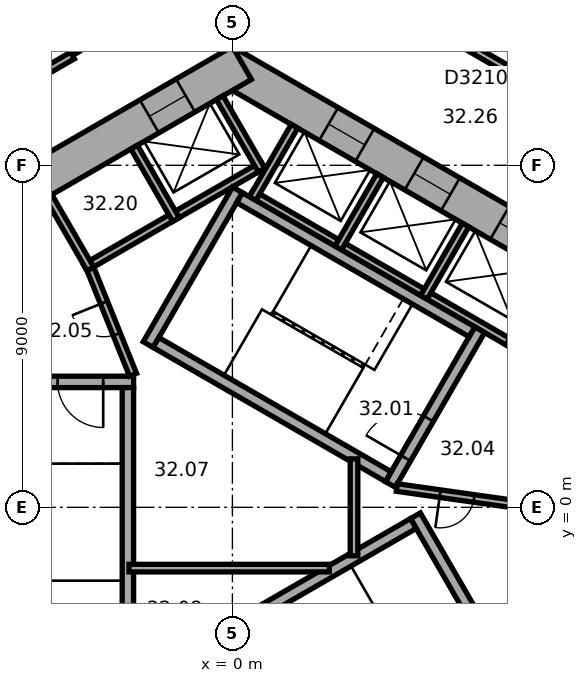
"""IFC4 building model, lengths in metres.
Left out: names, types, materials, properties, quantities, classifications, styles, units other than length and angle.
Written with IfcOpenShell. Run it as: python <this file> out.ifc"""

import sys

from ifc_helpers import new_model, si_unit, direction, frame, frame_2d, origin, place, context, subcontext, project, spatial, rectangle, extrude, element, fill, save


model = new_model("IFC4")
c1 = context("Model", 3, precision=1e-05, world=origin(), true_north=direction((0.0, 1.0)))
c2 = subcontext(c1, "Body", "Model", "MODEL_VIEW")
j1 = project(units=[si_unit("LENGTHUNIT", "METRE"), si_unit("PLANEANGLEUNIT", "RADIAN")], contexts=[c1])
p1 = place(None, origin())
s1 = spatial("IfcSite", under=j1, at=p1, CompositionType="ELEMENT")
p2 = place(p1, origin())
s2 = spatial("IfcBuilding", under=s1, at=p2, CompositionType="ELEMENT")
p3 = place(p2, frame((0.0, 0.0, 131.8)))
s3 = spatial("IfcBuildingStorey", under=s2, at=p3, CompositionType="ELEMENT", Elevation=131.8)
p4 = place(p3, frame((10.25, 5.629, 0.0), z_axis=(0.0, 0.0, 1.0), x_axis=(-0.866022616891, 0.50000482701, 0.0)))
e1 = element("IfcWall", 1, at=p4, inside=s3, PredefinedType="SHEAR", context=c2, shape_type="SweptSolid", body=[
    extrude(rectangle(XDim=12.125, YDim=1.0, at=frame_2d((6.062, 0.0))), origin(), (0.0, 0.0, 1.0), 3.7),
])
p5 = place(p4, frame((2.612, 0.0, 0.0)))
e2 = element("IfcOpeningElement", 2, at=p5, cuts=e1, PredefinedType="OPENING", context=c2, shape_type="SweptSolid", body=[
    extrude(rectangle(XDim=1.1, YDim=2.1, at=frame_2d((0.55, 1.05))), frame((0.0, 0.51, 0.0), z_axis=(0.0, -1.0, 0.0), x_axis=(1.0, 0.0, 0.0)), (0.0, 0.0, 1.0), 1.02),
])
p6 = place(p4, frame((5.212, 0.0, 0.0)))
e3 = element("IfcOpeningElement", 3, at=p6, cuts=e1, PredefinedType="OPENING", context=c2, shape_type="SweptSolid", body=[
    extrude(rectangle(XDim=1.1, YDim=2.1, at=frame_2d((0.55, 1.05))), frame((0.0, 0.51, 0.0), z_axis=(0.0, -1.0, 0.0), x_axis=(1.0, 0.0, 0.0)), (0.0, 0.0, 1.0), 1.02),
])
p7 = place(p4, frame((7.812, 0.0, 0.0)))
e4 = element("IfcOpeningElement", 4, at=p7, cuts=e1, PredefinedType="OPENING", context=c2, shape_type="SweptSolid", body=[
    extrude(rectangle(XDim=1.1, YDim=2.1, at=frame_2d((0.55, 1.05))), frame((0.0, 0.51, 0.0), z_axis=(0.0, -1.0, 0.0), x_axis=(1.0, 0.0, 0.0)), (0.0, 0.0, 1.0), 1.02),
])
p8 = place(p3, frame((0.25, 11.691, 0.0), z_axis=(0.0, 0.0, 1.0), x_axis=(-0.866022616891, -0.50000482701, 0.0)))
e5 = element("IfcWall", 5, at=p8, inside=s3, PredefinedType="SHEAR", context=c2, shape_type="SweptSolid", body=[
    extrude(rectangle(XDim=12.125, YDim=1.0, at=frame_2d((6.062, 0.0))), origin(), (0.0, 0.0, 1.0), 3.7),
])
p9 = place(p8, frame((6.262, 0.0, 0.0)))
e6 = element("IfcOpeningElement", 6, at=p9, cuts=e5, PredefinedType="OPENING", context=c2, shape_type="SweptSolid", body=[
    extrude(rectangle(XDim=1.5, YDim=2.1, at=frame_2d((0.75, 1.05))), frame((0.0, 0.51, 0.0), z_axis=(0.0, -1.0, 0.0), x_axis=(1.0, 0.0, 0.0)), (0.0, 0.0, 1.0), 1.02),
])
p10 = place(p8, frame((1.712, 0.0, 0.0)))
e7 = element("IfcOpeningElement", 7, at=p10, cuts=e5, PredefinedType="OPENING", context=c2, shape_type="SweptSolid", body=[
    extrude(rectangle(XDim=1.1, YDim=2.1, at=frame_2d((0.55, 1.05))), frame((0.0, 0.51, 0.0), z_axis=(0.0, -1.0, 0.0), x_axis=(1.0, 0.0, 0.0)), (0.0, 0.0, 1.0), 1.02),
])
p11 = place(p3, frame((7.424, 4.259, 0.0), z_axis=(0.0, 0.0, 1.0), x_axis=(-0.866026010844, 0.49999894854, 0.0)))
e8 = element("IfcWall", 8, at=p11, inside=s3, PredefinedType="PARTITIONING", context=c2, shape_type="SweptSolid", body=[
    extrude(rectangle(XDim=8.0, YDim=0.2, at=frame_2d((4.0, 0.0))), origin(), (0.0, 0.0, 1.0), 3.42),
])
for number, where, z_axis, x_axis in (
    (9, (7.287, 4.222, 0.0), (0.0, 0.0, 1.0), (0.5, 0.866, 0.0)),
    (10, (5.036, 5.522, 0.0), (0.0, 0.0, 1.0), (0.5, 0.866, 0.0)),
    (11, (2.784, 6.822, 0.0), (0.0, 0.0, 1.0), (0.5, 0.866, 0.0)),
    (12, (0.532, 8.122, 0.0), (0.0, 0.0, 1.0), (0.5, 0.866, 0.0)),
):
    element("IfcWall", number, at=place(p3, frame(where, z_axis=z_axis, x_axis=x_axis)), inside=s3, PredefinedType="PARTITIONING", context=c2, shape_type="SweptSolid", body=[
        extrude(rectangle(XDim=2.2, YDim=0.2, at=frame_2d((1.1, 0.0))), origin(), (0.0, 0.0, 1.0), 3.42),
    ])
p12 = place(p3, frame((0.803, 9.009, 0.0), z_axis=(0.0, 0.0, 1.0), x_axis=(-0.866028230842, -0.499995103361, 0.0)))
e13 = element("IfcWall", 13, at=p12, inside=s3, PredefinedType="PARTITIONING", context=c2, shape_type="SweptSolid", body=[
    extrude(rectangle(XDim=5.4, YDim=0.2, at=frame_2d((2.7, 0.0))), origin(), (0.0, 0.0, 1.0), 3.42),
])
p13 = place(p3, frame((0.767, 8.872, 0.0), z_axis=(0.0, 0.0, 1.0), x_axis=(-0.499994660107, 0.866028486751, 0.0)))
e14 = element("IfcWall", 14, at=p13, inside=s3, PredefinedType="PARTITIONING", context=c2, shape_type="SweptSolid", body=[
    extrude(rectangle(XDim=2.2, YDim=0.2, at=frame_2d((1.1, 0.0))), origin(), (0.0, 0.0, 1.0), 3.42),
])
for number, where, z_axis, x_axis in (
    (15, (-1.485, 7.572, 0.0), (0.0, 0.0, 1.0), (-0.5, 0.866, 0.0)),
    (16, (-3.737, 6.272, 0.0), (0.0, 0.0, 1.0), (-0.5, 0.866, 0.0)),
):
    element("IfcWall", number, at=place(p3, frame(where, z_axis=z_axis, x_axis=x_axis)), inside=s3, PredefinedType="PARTITIONING", context=c2, shape_type="SweptSolid", body=[
        extrude(rectangle(XDim=2.2, YDim=0.2, at=frame_2d((1.1, 0.0))), origin(), (0.0, 0.0, 1.0), 3.42),
    ])
p14 = place(p3, frame((4.158, 0.602, 0.0), z_axis=(0.0, 0.0, 1.0), x_axis=(0.499977259774, 0.866038532462, 0.0)))
e17 = element("IfcWall", 17, at=p14, inside=s3, PredefinedType="SHEAR", context=c2, shape_type="SweptSolid", body=[
    extrude(rectangle(XDim=4.7, YDim=0.3, at=frame_2d((2.35, 0.0))), origin(), (0.0, 0.0, 1.0), 3.42),
])
p15 = place(p14, frame((0.8, 0.0, 0.0)))
e18 = element("IfcOpeningElement", 18, at=p15, cuts=e17, PredefinedType="OPENING", context=c2, shape_type="SweptSolid", body=[
    extrude(rectangle(XDim=1.2, YDim=2.1, at=frame_2d((0.6, 1.05))), frame((0.0, 0.16, 0.0), z_axis=(0.0, -1.0, 0.0), x_axis=(1.0, 0.0, 0.0)), (0.0, 0.0, 1.0), 0.32),
])
p16 = place(p3, frame((-2.216, 4.282, 0.0), z_axis=(0.0, 0.0, 1.0), x_axis=(0.499977259774, 0.866038532462, 0.0)))
e19 = element("IfcWall", 19, at=p16, inside=s3, PredefinedType="SHEAR", context=c2, shape_type="SweptSolid", body=[
    extrude(rectangle(XDim=4.7, YDim=0.3, at=frame_2d((2.35, 0.0))), origin(), (0.0, 0.0, 1.0), 3.42),
])
for number, where, z_axis, x_axis in (
    (20, (4.103, 0.807, 0.0), (0.0, 0.0, 1.0), (-0.866, 0.5, 0.0)),
    (21, (6.303, 4.617, 0.0), (0.0, 0.0, 1.0), (-0.866, 0.5, 0.0)),
):
    element("IfcWall", number, at=place(p3, frame(where, z_axis=z_axis, x_axis=x_axis)), inside=s3, PredefinedType="SHEAR", context=c2, shape_type="SweptSolid", body=[
        extrude(rectangle(XDim=7.06, YDim=0.3, at=frame_2d((3.53, 0.0))), origin(), (0.0, 0.0, 1.0), 3.42),
    ])
p17 = place(p3, frame((-2.6, 3.3, 0.0), z_axis=(0.0, 0.0, 1.0), x_axis=(-1.0, 0.0, 0.0)))
e22 = element("IfcWall", 22, at=p17, inside=s3, PredefinedType="SHEAR", context=c2, shape_type="SweptSolid", body=[
    extrude(rectangle(XDim=4.7, YDim=0.3, at=frame_2d((2.35, 0.0))), origin(), (0.0, 0.0, 1.0), 3.42),
])
p18 = place(p17, frame((0.8, 0.0, 0.0)))
e23 = element("IfcOpeningElement", 23, at=p18, cuts=e22, PredefinedType="OPENING", context=c2, shape_type="SweptSolid", body=[
    extrude(rectangle(XDim=1.2, YDim=2.1, at=frame_2d((0.6, 1.05))), frame((0.0, 0.16, 0.0), z_axis=(0.0, -1.0, 0.0), x_axis=(1.0, 0.0, 0.0)), (0.0, 0.0, 1.0), 0.32),
])
p19 = place(p3, frame((-2.75, 3.15, 0.0), z_axis=(0.0, 0.0, 1.0), x_axis=(0.0, -1.0, 0.0)))
e24 = element("IfcWall", 24, at=p19, inside=s3, PredefinedType="SHEAR", context=c2, shape_type="SweptSolid", body=[
    extrude(rectangle(XDim=7.06, YDim=0.3, at=frame_2d((3.53, 0.0))), origin(), (0.0, 0.0, 1.0), 3.42),
])
p20 = place(p3, frame((4.816, -0.222, 0.0), z_axis=(0.0, 0.0, 1.0), x_axis=(0.499977259774, -0.866038532462, 0.0)))
e25 = element("IfcWall", 25, at=p20, inside=s3, PredefinedType="SHEAR", context=c2, shape_type="SweptSolid", body=[
    extrude(rectangle(XDim=4.7, YDim=0.3, at=frame_2d((2.35, 0.0))), origin(), (0.0, 0.0, 1.0), 3.42),
])
p21 = place(p3, frame((-1.353, -3.957, 0.0), z_axis=(0.0, 0.0, 1.0), x_axis=(0.866027801685, 0.499995846692, 0.0)))
e26 = element("IfcWall", 26, at=p21, inside=s3, PredefinedType="SHEAR", context=c2, shape_type="SweptSolid", body=[
    extrude(rectangle(XDim=7.06, YDim=0.3, at=frame_2d((3.53, 0.0))), origin(), (0.0, 0.0, 1.0), 3.42),
])
p22 = place(p3, frame((4.327, 0.521, 0.0), z_axis=(0.0, 0.0, 1.0), x_axis=(0.990124376366, -0.14019172346, 0.0)))
e27 = element("IfcWall", 27, at=p22, inside=s3, PredefinedType="PARTITIONING", context=c2, shape_type="SweptSolid", body=[
    extrude(rectangle(XDim=3.002, YDim=0.2, at=frame_2d((1.501, 0.0))), origin(), (0.0, 0.0, 1.0), 3.42),
])
p23 = place(p22, frame((1.15, 0.0, 0.0)))
e28 = element("IfcOpeningElement", 28, at=p23, cuts=e27, PredefinedType="OPENING", context=c2, shape_type="SweptSolid", body=[
    extrude(rectangle(XDim=0.9, YDim=2.1, at=frame_2d((0.45, 1.05))), frame((0.0, 0.11, 0.0), z_axis=(0.0, -1.0, 0.0), x_axis=(1.0, 0.0, 0.0)), (0.0, 0.0, 1.0), 0.22),
])
p24 = place(p3, frame((-2.615, 3.487, 0.0), z_axis=(0.0, 0.0, 1.0), x_axis=(-0.373576831041, 0.92759924068, 0.0)))
e29 = element("IfcWall", 29, at=p24, inside=s3, PredefinedType="PARTITIONING", context=c2, shape_type="SweptSolid", body=[
    extrude(rectangle(XDim=3.002, YDim=0.2, at=frame_2d((1.501, 0.0))), origin(), (0.0, 0.0, 1.0), 3.42),
])
p25 = place(p24, frame((1.15, 0.0, 0.0)))
e30 = element("IfcOpeningElement", 30, at=p25, cuts=e29, PredefinedType="OPENING", context=c2, shape_type="SweptSolid", body=[
    extrude(rectangle(XDim=0.9, YDim=2.1, at=frame_2d((0.45, 1.05))), frame((0.0, 0.11, 0.0), z_axis=(0.0, -1.0, 0.0), x_axis=(1.0, 0.0, 0.0)), (0.0, 0.0, 1.0), 0.22),
])
p26 = place(p3, frame((-2.72, -1.6, 0.0), z_axis=(0.0, 0.0, 1.0), x_axis=(1.0, 0.0, 0.0)))
e31 = element("IfcWall", 31, at=p26, inside=s3, PredefinedType="PARTITIONING", context=c2, shape_type="SweptSolid", body=[
    extrude(rectangle(XDim=5.269, YDim=0.2, at=frame_2d((2.634, 0.0))), origin(), (0.0, 0.0, 1.0), 3.42),
])
p27 = place(p3, frame((3.2, -1.275, 0.0), z_axis=(0.0, 0.0, 1.0), x_axis=(0.0, 1.0, 0.0)))
e32 = element("IfcWall", 32, at=p27, inside=s3, PredefinedType="PARTITIONING", context=c2, shape_type="SweptSolid", body=[
    extrude(rectangle(XDim=2.549, YDim=0.2, at=frame_2d((1.275, 0.0))), origin(), (0.0, 0.0, 1.0), 3.42),
])
p28 = place(p3, frame((-4.723, 12.978, 0.0), z_axis=(0.0, 0.0, 1.0), x_axis=(0.500074377092, -0.865982457891, 0.0)))
e33 = element("IfcWall", 33, at=p28, inside=s3, PredefinedType="PARTITIONING", context=c2, shape_type="SweptSolid", body=[
    extrude(rectangle(XDim=1.201, YDim=0.2, at=frame_2d((0.601, 0.0))), origin(), (0.0, 0.0, 1.0), 3.42),
])
p29 = place(p3, frame((-4.209, 11.888, 0.0), z_axis=(0.0, 0.0, 1.0), x_axis=(-0.866020930448, -0.500007747966, 0.0)))
e34 = element("IfcWall", 34, at=p29, inside=s3, PredefinedType="PARTITIONING", context=c2, shape_type="SweptSolid", body=[
    extrude(rectangle(XDim=8.321, YDim=0.2, at=frame_2d((4.161, 0.0))), origin(), (0.0, 0.0, 1.0), 3.42),
])
p30 = place(p29, frame((5.439, 0.0, 0.0)))
e35 = element("IfcOpeningElement", 35, at=p30, cuts=e34, PredefinedType="OPENING", context=c2, shape_type="SweptSolid", body=[
    extrude(rectangle(XDim=1.0, YDim=2.1, at=frame_2d((0.5, 1.05))), frame((0.0, 0.11, 0.0), z_axis=(0.0, -1.0, 0.0), x_axis=(1.0, 0.0, 0.0)), (0.0, 0.0, 1.0), 0.22),
])
p31 = place(p3, frame((11.646, 8.981, 0.0), z_axis=(0.0, 0.0, 1.0), x_axis=(-0.866027142779, 0.499996987961, 0.0)))
e36 = element("IfcWall", 36, at=p31, inside=s3, PredefinedType="PARTITIONING", context=c2, shape_type="SweptSolid", body=[
    extrude(rectangle(XDim=9.597, YDim=0.2, at=frame_2d((4.798, 0.0))), origin(), (0.0, 0.0, 1.0), 3.42),
])
p32 = place(p31, frame((1.331, 0.0, 0.0)))
e37 = element("IfcOpeningElement", 37, at=p32, cuts=e36, PredefinedType="OPENING", context=c2, shape_type="SweptSolid", body=[
    extrude(rectangle(XDim=1.0, YDim=2.1, at=frame_2d((0.5, 1.05))), frame((0.0, 0.11, 0.0), z_axis=(0.0, -1.0, 0.0), x_axis=(1.0, 0.0, 0.0)), (0.0, 0.0, 1.0), 0.22),
])
p33 = place(p31, frame((5.042, 0.0, 0.0)))
e38 = element("IfcOpeningElement", 38, at=p33, cuts=e36, PredefinedType="OPENING", context=c2, shape_type="SweptSolid", body=[
    extrude(rectangle(XDim=1.0, YDim=2.1, at=frame_2d((0.5, 1.05))), frame((0.0, 0.11, 0.0), z_axis=(0.0, -1.0, 0.0), x_axis=(1.0, 0.0, 0.0)), (0.0, 0.0, 1.0), 0.22),
])
p34 = place(p31, frame((8.01, 0.0, 0.0)))
e39 = element("IfcOpeningElement", 39, at=p34, cuts=e36, PredefinedType="OPENING", context=c2, shape_type="SweptSolid", body=[
    extrude(rectangle(XDim=1.0, YDim=2.1, at=frame_2d((0.5, 1.05))), frame((0.0, 0.11, 0.0), z_axis=(0.0, -1.0, 0.0), x_axis=(1.0, 0.0, 0.0)), (0.0, 0.0, 1.0), 0.22),
])
p35 = place(p15, origin())
e40 = element("IfcDoor", 40, at=p35, inside=s3, OperationType="SINGLE_SWING_RIGHT", PredefinedType="DOOR", context=c2, shape_type="SweptSolid", body=[
    extrude(rectangle(XDim=1.2, YDim=2.1, at=frame_2d((0.6, 1.05))), frame((0.0, 0.025, 0.0), z_axis=(0.0, -1.0, 0.0), x_axis=(1.0, 0.0, 0.0)), (0.0, 0.0, 1.0), 0.05),
])
fill(e18, e40)
p36 = place(p18, origin())
e41 = element("IfcDoor", 41, at=p36, inside=s3, OperationType="SINGLE_SWING_RIGHT", PredefinedType="DOOR", context=c2, shape_type="SweptSolid", body=[
    extrude(rectangle(XDim=1.2, YDim=2.1, at=frame_2d((0.6, 1.05))), frame((0.0, 0.025, 0.0), z_axis=(0.0, -1.0, 0.0), x_axis=(1.0, 0.0, 0.0)), (0.0, 0.0, 1.0), 0.05),
])
fill(e23, e41)
p37 = place(p23, origin())
e42 = element("IfcDoor", 42, at=p37, inside=s3, OperationType="SINGLE_SWING_LEFT", PredefinedType="DOOR", context=c2, shape_type="SweptSolid", body=[
    extrude(rectangle(XDim=0.9, YDim=2.1, at=frame_2d((0.45, 1.05))), frame((0.0, 0.025, 0.0), z_axis=(0.0, -1.0, 0.0), x_axis=(1.0, 0.0, 0.0)), (0.0, 0.0, 1.0), 0.05),
])
fill(e28, e42)
p38 = place(p25, origin())
e43 = element("IfcDoor", 43, at=p38, inside=s3, OperationType="SINGLE_SWING_LEFT", PredefinedType="DOOR", context=c2, shape_type="SweptSolid", body=[
    extrude(rectangle(XDim=0.9, YDim=2.1, at=frame_2d((0.45, 1.05))), frame((0.0, 0.025, 0.0), z_axis=(0.0, -1.0, 0.0), x_axis=(1.0, 0.0, 0.0)), (0.0, 0.0, 1.0), 0.05),
])
fill(e30, e43)
p39 = place(p5, origin())
e44 = element("IfcDoor", 44, at=p39, inside=s3, OperationType="DOUBLE_DOOR_SLIDING", PredefinedType="DOOR", context=c2, shape_type="SweptSolid", body=[
    extrude(rectangle(XDim=1.1, YDim=2.1, at=frame_2d((0.55, 1.05))), frame((0.0, 0.025, 0.0), z_axis=(0.0, -1.0, 0.0), x_axis=(1.0, 0.0, 0.0)), (0.0, 0.0, 1.0), 0.05),
])
fill(e2, e44)
p40 = place(p6, origin())
e45 = element("IfcDoor", 45, at=p40, inside=s3, OperationType="DOUBLE_DOOR_SLIDING", PredefinedType="DOOR", context=c2, shape_type="SweptSolid", body=[
    extrude(rectangle(XDim=1.1, YDim=2.1, at=frame_2d((0.55, 1.05))), frame((0.0, 0.025, 0.0), z_axis=(0.0, -1.0, 0.0), x_axis=(1.0, 0.0, 0.0)), (0.0, 0.0, 1.0), 0.05),
])
fill(e3, e45)
p41 = place(p7, origin())
e46 = element("IfcDoor", 46, at=p41, inside=s3, OperationType="DOUBLE_DOOR_SLIDING", PredefinedType="DOOR", context=c2, shape_type="SweptSolid", body=[
    extrude(rectangle(XDim=1.1, YDim=2.1, at=frame_2d((0.55, 1.05))), frame((0.0, 0.025, 0.0), z_axis=(0.0, -1.0, 0.0), x_axis=(1.0, 0.0, 0.0)), (0.0, 0.0, 1.0), 0.05),
])
fill(e4, e46)
p42 = place(p10, origin())
e47 = element("IfcDoor", 47, at=p42, inside=s3, OperationType="DOUBLE_DOOR_SLIDING", PredefinedType="DOOR", context=c2, shape_type="SweptSolid", body=[
    extrude(rectangle(XDim=1.1, YDim=2.1, at=frame_2d((0.55, 1.05))), frame((0.0, 0.025, 0.0), z_axis=(0.0, -1.0, 0.0), x_axis=(1.0, 0.0, 0.0)), (0.0, 0.0, 1.0), 0.05),
])
fill(e7, e47)
p43 = place(p33, origin())
e48 = element("IfcDoor", 48, at=p43, inside=s3, OperationType="SINGLE_SWING_LEFT", PredefinedType="DOOR", context=c2, shape_type="SweptSolid", body=[
    extrude(rectangle(XDim=1.0, YDim=2.1, at=frame_2d((0.5, 1.05))), frame((0.0, 0.025, 0.0), z_axis=(0.0, -1.0, 0.0), x_axis=(1.0, 0.0, 0.0)), (0.0, 0.0, 1.0), 0.05),
])
fill(e38, e48)
save(model, sys.argv[1])
